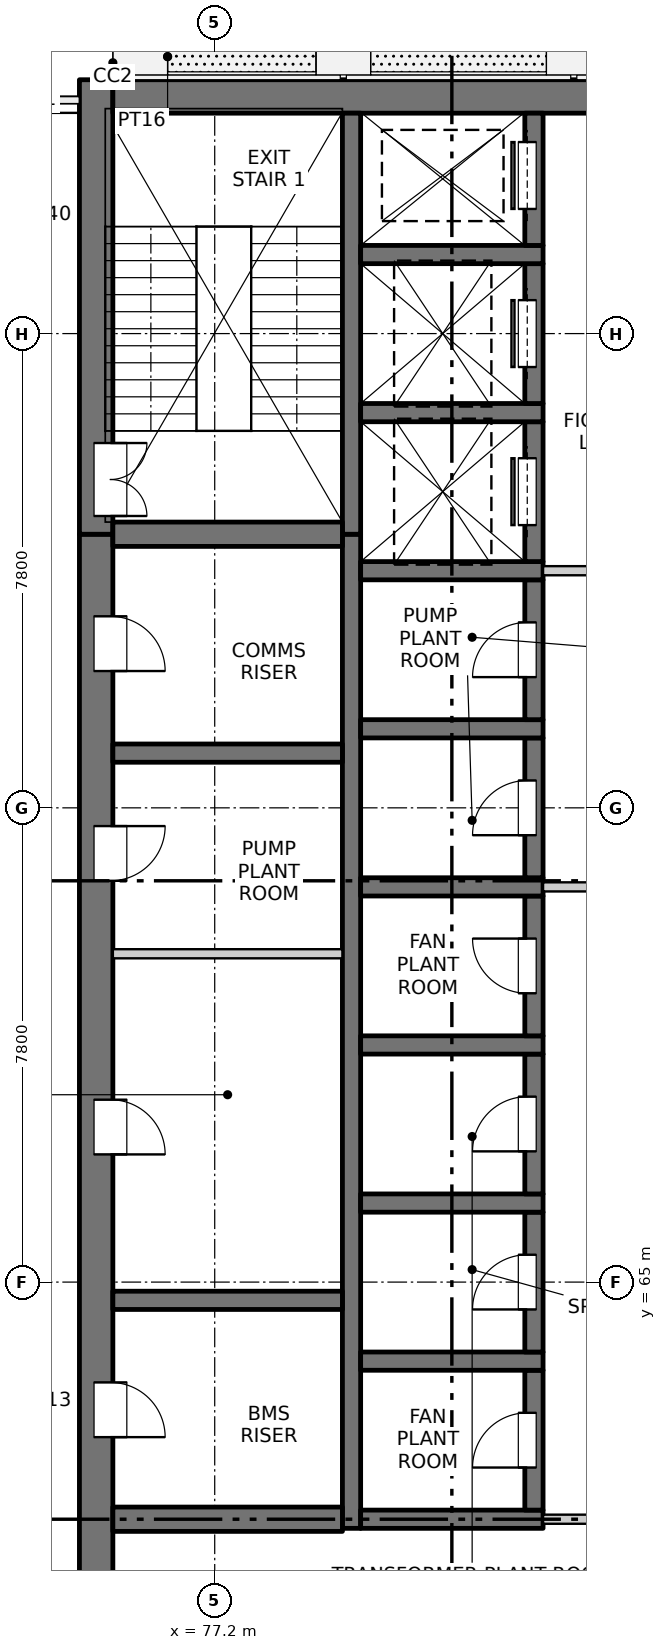
"""IFC4 building model, lengths in metres.
Left out: names, types, materials, properties, quantities, classifications, styles, units other than length and angle.
Written with IfcOpenShell. Run it as: python <this file> out.ifc"""

import sys

from ifc_helpers import new_model, si_unit, direction, frame, frame_2d, origin, place, context, subcontext, project, spatial, rectangle, extrude, element, fill, save


model = new_model("IFC4")
c1 = context("Model", 3, precision=1e-05, world=origin(), true_north=direction((0.0, 1.0)))
c2 = subcontext(c1, "Body", "Model", "MODEL_VIEW")
j1 = project(units=[si_unit("LENGTHUNIT", "METRE"), si_unit("PLANEANGLEUNIT", "RADIAN")], contexts=[c1])
p1 = place(None, origin())
s1 = spatial("IfcSite", under=j1, at=p1, CompositionType="ELEMENT")
p2 = place(p1, origin())
s2 = spatial("IfcBuilding", under=s1, at=p2, CompositionType="ELEMENT")
p3 = place(p2, frame((0.0, 0.0, 192.8)))
s3 = spatial("IfcBuildingStorey", under=s2, at=p3, CompositionType="ELEMENT", Elevation=192.8)
p4 = place(p3, frame((75.25, 54.975, -0.3), z_axis=(0.0, 0.0, 1.0), x_axis=(0.0, 1.0, 0.0)))
e1 = element("IfcWall", 1, at=p4, inside=s3, PredefinedType="SOLIDWALL", context=c2, shape_type="SweptSolid", body=[
    extrude(rectangle(XDim=22.325, YDim=0.55, at=frame_2d((11.163, 0.0))), origin(), (0.0, 0.0, 1.0), 4.5),
])
p5 = place(p4, frame((7.475, 0.0, 0.3)))
e2 = element("IfcOpeningElement", 2, at=p5, cuts=e1, PredefinedType="OPENING", context=c2, shape_type="SweptSolid", body=[
    extrude(rectangle(XDim=0.9, YDim=2.1, at=frame_2d((0.45, 1.05))), frame((0.0, 0.285, 0.0), z_axis=(0.0, -1.0, 0.0), x_axis=(1.0, 0.0, 0.0)), (0.0, 0.0, 1.0), 0.57),
])
p6 = place(p4, frame((12.125, 0.0, 0.3)))
e3 = element("IfcOpeningElement", 3, at=p6, cuts=e1, PredefinedType="OPENING", context=c2, shape_type="SweptSolid", body=[
    extrude(rectangle(XDim=0.9, YDim=2.1, at=frame_2d((0.45, 1.05))), frame((0.0, 0.285, 0.0), z_axis=(0.0, -1.0, 0.0), x_axis=(1.0, 0.0, 0.0)), (0.0, 0.0, 1.0), 0.57),
])
p7 = place(p4, frame((16.625, 0.0, 0.3)))
e4 = element("IfcOpeningElement", 4, at=p7, cuts=e1, PredefinedType="OPENING", context=c2, shape_type="SweptSolid", body=[
    extrude(rectangle(XDim=0.9, YDim=2.1, at=frame_2d((0.45, 1.05))), frame((0.0, 0.285, 0.0), z_axis=(0.0, -1.0, 0.0), x_axis=(1.0, 0.0, 0.0)), (0.0, 0.0, 1.0), 0.57),
])
p8 = place(p4, frame((20.075, 0.0, 0.3)))
e5 = element("IfcOpeningElement", 5, at=p8, cuts=e1, PredefinedType="OPENING", context=c2, shape_type="SweptSolid", body=[
    extrude(rectangle(XDim=0.9, YDim=2.1, at=frame_2d((0.45, 1.05))), frame((0.0, 0.285, 0.0), z_axis=(0.0, -1.0, 0.0), x_axis=(1.0, 0.0, 0.0)), (0.0, 0.0, 1.0), 0.57),
])
p9 = place(p3, frame((75.25, 77.3, -0.3), z_axis=(0.0, 0.0, 1.0), x_axis=(0.0, 1.0, 0.0)))
e6 = element("IfcWall", 6, at=p9, inside=s3, PredefinedType="SOLIDWALL", context=c2, shape_type="SweptSolid", body=[
    extrude(rectangle(XDim=7.475, YDim=0.55, at=frame_2d((3.737, 0.0))), origin(), (0.0, 0.0, 1.0), 4.5),
])
p10 = place(p9, frame((0.3, 0.0, 0.3)))
e7 = element("IfcOpeningElement", 7, at=p10, cuts=e6, PredefinedType="OPENING", context=c2, shape_type="SweptSolid", body=[
    extrude(rectangle(XDim=1.2, YDim=2.1, at=frame_2d((0.6, 1.05))), frame((0.0, 0.285, 0.0), z_axis=(0.0, -1.0, 0.0), x_axis=(1.0, 0.0, 0.0)), (0.0, 0.0, 1.0), 0.57),
])
p11 = place(p3, frame((75.525, 84.5, -0.3), z_axis=(0.0, 0.0, 1.0), x_axis=(1.0, 0.0, 0.0)))
e8 = element("IfcWall", 8, at=p11, inside=s3, PredefinedType="SOLIDWALL", context=c2, shape_type="SweptSolid", body=[
    extrude(rectangle(XDim=18.95, YDim=0.55, at=frame_2d((9.475, 0.0))), origin(), (0.0, 0.0, 1.0), 4.5),
])
p12 = place(p3, frame((79.45, 60.95, -0.3), z_axis=(0.0, 0.0, 1.0), x_axis=(0.0, 1.0, 0.0)))
e9 = element("IfcWall", 9, at=p12, inside=s3, PredefinedType="SOLIDWALL", context=c2, shape_type="SweptSolid", body=[
    extrude(rectangle(XDim=16.35, YDim=0.3, at=frame_2d((8.175, 0.0))), origin(), (0.0, 0.0, 1.0), 4.5),
])
p13 = place(p3, frame((79.45, 77.3, -0.3), z_axis=(0.0, 0.0, 1.0), x_axis=(0.0, 1.0, 0.0)))
e10 = element("IfcWall", 10, at=p13, inside=s3, PredefinedType="SOLIDWALL", context=c2, shape_type="SweptSolid", body=[
    extrude(rectangle(XDim=6.925, YDim=0.3, at=frame_2d((3.462, 0.0))), origin(), (0.0, 0.0, 1.0), 4.5),
])
p14 = place(p3, frame((79.6, 61.1, -0.3), z_axis=(0.0, 0.0, 1.0), x_axis=(1.0, 0.0, 0.0)))
e11 = element("IfcWall", 11, at=p14, inside=s3, PredefinedType="SOLIDWALL", context=c2, shape_type="SweptSolid", body=[
    extrude(rectangle(XDim=3.0, YDim=0.3, at=frame_2d((1.5, 0.0))), origin(), (0.0, 0.0, 1.0), 4.5),
])
p15 = place(p3, frame((82.45, 61.25, -0.3), z_axis=(0.0, 0.0, 1.0), x_axis=(0.0, 1.0, 0.0)))
e12 = element("IfcWall", 12, at=p15, inside=s3, PredefinedType="SOLIDWALL", context=c2, shape_type="SweptSolid", body=[
    extrude(rectangle(XDim=2.3, YDim=0.3, at=frame_2d((1.15, 0.0))), origin(), (0.0, 0.0, 1.0), 4.5),
])
p16 = place(p15, frame((0.7, 0.0, 0.3)))
e13 = element("IfcOpeningElement", 13, at=p16, cuts=e12, PredefinedType="OPENING", context=c2, shape_type="SweptSolid", body=[
    extrude(rectangle(XDim=0.9, YDim=2.1, at=frame_2d((0.45, 1.05))), frame((0.0, 0.16, 0.0), z_axis=(0.0, -1.0, 0.0), x_axis=(1.0, 0.0, 0.0)), (0.0, 0.0, 1.0), 0.32),
])
p17 = place(p3, frame((79.6, 63.7, -0.3), z_axis=(0.0, 0.0, 1.0), x_axis=(1.0, 0.0, 0.0)))
e14 = element("IfcWall", 14, at=p17, inside=s3, PredefinedType="SOLIDWALL", context=c2, shape_type="SweptSolid", body=[
    extrude(rectangle(XDim=3.0, YDim=0.3, at=frame_2d((1.5, 0.0))), origin(), (0.0, 0.0, 1.0), 4.5),
])
p18 = place(p3, frame((82.45, 63.85, -0.3), z_axis=(0.0, 0.0, 1.0), x_axis=(0.0, 1.0, 0.0)))
e15 = element("IfcWall", 15, at=p18, inside=s3, PredefinedType="SOLIDWALL", context=c2, shape_type="SweptSolid", body=[
    extrude(rectangle(XDim=2.3, YDim=0.3, at=frame_2d((1.15, 0.0))), origin(), (0.0, 0.0, 1.0), 4.5),
])
p19 = place(p18, frame((0.7, 0.0, 0.3)))
e16 = element("IfcOpeningElement", 16, at=p19, cuts=e15, PredefinedType="OPENING", context=c2, shape_type="SweptSolid", body=[
    extrude(rectangle(XDim=0.9, YDim=2.1, at=frame_2d((0.45, 1.05))), frame((0.0, 0.16, 0.0), z_axis=(0.0, -1.0, 0.0), x_axis=(1.0, 0.0, 0.0)), (0.0, 0.0, 1.0), 0.32),
])
p20 = place(p3, frame((79.6, 66.3, -0.3), z_axis=(0.0, 0.0, 1.0), x_axis=(1.0, 0.0, 0.0)))
e17 = element("IfcWall", 17, at=p20, inside=s3, PredefinedType="SOLIDWALL", context=c2, shape_type="SweptSolid", body=[
    extrude(rectangle(XDim=3.0, YDim=0.3, at=frame_2d((1.5, 0.0))), origin(), (0.0, 0.0, 1.0), 4.5),
])
p21 = place(p3, frame((82.45, 66.45, -0.3), z_axis=(0.0, 0.0, 1.0), x_axis=(0.0, 1.0, 0.0)))
e18 = element("IfcWall", 18, at=p21, inside=s3, PredefinedType="SOLIDWALL", context=c2, shape_type="SweptSolid", body=[
    extrude(rectangle(XDim=2.3, YDim=0.3, at=frame_2d((1.15, 0.0))), origin(), (0.0, 0.0, 1.0), 4.5),
])
p22 = place(p21, frame((0.7, 0.0, 0.3)))
e19 = element("IfcOpeningElement", 19, at=p22, cuts=e18, PredefinedType="OPENING", context=c2, shape_type="SweptSolid", body=[
    extrude(rectangle(XDim=0.9, YDim=2.1, at=frame_2d((0.45, 1.05))), frame((0.0, 0.16, 0.0), z_axis=(0.0, -1.0, 0.0), x_axis=(1.0, 0.0, 0.0)), (0.0, 0.0, 1.0), 0.32),
])
p23 = place(p3, frame((79.6, 68.9, -0.3), z_axis=(0.0, 0.0, 1.0), x_axis=(1.0, 0.0, 0.0)))
e20 = element("IfcWall", 20, at=p23, inside=s3, PredefinedType="SOLIDWALL", context=c2, shape_type="SweptSolid", body=[
    extrude(rectangle(XDim=3.0, YDim=0.3, at=frame_2d((1.5, 0.0))), origin(), (0.0, 0.0, 1.0), 4.5),
])
p24 = place(p3, frame((82.45, 69.05, -0.3), z_axis=(0.0, 0.0, 1.0), x_axis=(0.0, 1.0, 0.0)))
e21 = element("IfcWall", 21, at=p24, inside=s3, PredefinedType="SOLIDWALL", context=c2, shape_type="SweptSolid", body=[
    extrude(rectangle(XDim=2.3, YDim=0.3, at=frame_2d((1.15, 0.0))), origin(), (0.0, 0.0, 1.0), 4.5),
])
p25 = place(p24, frame((0.7, 0.0, 0.3)))
e22 = element("IfcOpeningElement", 22, at=p25, cuts=e21, PredefinedType="OPENING", context=c2, shape_type="SweptSolid", body=[
    extrude(rectangle(XDim=0.9, YDim=2.1, at=frame_2d((0.45, 1.05))), frame((0.0, 0.16, 0.0), z_axis=(0.0, -1.0, 0.0), x_axis=(1.0, 0.0, 0.0)), (0.0, 0.0, 1.0), 0.32),
])
p26 = place(p3, frame((79.6, 71.5, -0.3), z_axis=(0.0, 0.0, 1.0), x_axis=(1.0, 0.0, 0.0)))
e23 = element("IfcWall", 23, at=p26, inside=s3, PredefinedType="SOLIDWALL", context=c2, shape_type="SweptSolid", body=[
    extrude(rectangle(XDim=3.0, YDim=0.3, at=frame_2d((1.5, 0.0))), origin(), (0.0, 0.0, 1.0), 4.5),
])
p27 = place(p3, frame((82.45, 71.65, -0.3), z_axis=(0.0, 0.0, 1.0), x_axis=(0.0, 1.0, 0.0)))
e24 = element("IfcWall", 24, at=p27, inside=s3, PredefinedType="SOLIDWALL", context=c2, shape_type="SweptSolid", body=[
    extrude(rectangle(XDim=2.3, YDim=0.3, at=frame_2d((1.15, 0.0))), origin(), (0.0, 0.0, 1.0), 4.5),
])
p28 = place(p27, frame((0.7, 0.0, 0.3)))
e25 = element("IfcOpeningElement", 25, at=p28, cuts=e24, PredefinedType="OPENING", context=c2, shape_type="SweptSolid", body=[
    extrude(rectangle(XDim=0.9, YDim=2.1, at=frame_2d((0.45, 1.05))), frame((0.0, 0.16, 0.0), z_axis=(0.0, -1.0, 0.0), x_axis=(1.0, 0.0, 0.0)), (0.0, 0.0, 1.0), 0.32),
])
p29 = place(p3, frame((79.6, 74.1, -0.3), z_axis=(0.0, 0.0, 1.0), x_axis=(1.0, 0.0, 0.0)))
e26 = element("IfcWall", 26, at=p29, inside=s3, PredefinedType="SOLIDWALL", context=c2, shape_type="SweptSolid", body=[
    extrude(rectangle(XDim=3.0, YDim=0.3, at=frame_2d((1.5, 0.0))), origin(), (0.0, 0.0, 1.0), 4.5),
])
p30 = place(p3, frame((82.45, 74.25, -0.3), z_axis=(0.0, 0.0, 1.0), x_axis=(0.0, 1.0, 0.0)))
e27 = element("IfcWall", 27, at=p30, inside=s3, PredefinedType="SOLIDWALL", context=c2, shape_type="SweptSolid", body=[
    extrude(rectangle(XDim=2.3, YDim=0.3, at=frame_2d((1.15, 0.0))), origin(), (0.0, 0.0, 1.0), 4.5),
])
p31 = place(p30, frame((0.7, 0.0, 0.3)))
e28 = element("IfcOpeningElement", 28, at=p31, cuts=e27, PredefinedType="OPENING", context=c2, shape_type="SweptSolid", body=[
    extrude(rectangle(XDim=0.9, YDim=2.1, at=frame_2d((0.45, 1.05))), frame((0.0, 0.16, 0.0), z_axis=(0.0, -1.0, 0.0), x_axis=(1.0, 0.0, 0.0)), (0.0, 0.0, 1.0), 0.32),
])
p32 = place(p3, frame((79.6, 76.7, -0.3), z_axis=(0.0, 0.0, 1.0), x_axis=(1.0, 0.0, 0.0)))
e29 = element("IfcWall", 29, at=p32, inside=s3, PredefinedType="SOLIDWALL", context=c2, shape_type="SweptSolid", body=[
    extrude(rectangle(XDim=3.0, YDim=0.3, at=frame_2d((1.5, 0.0))), origin(), (0.0, 0.0, 1.0), 4.5),
])
p33 = place(p3, frame((82.45, 76.85, -0.3), z_axis=(0.0, 0.0, 1.0), x_axis=(0.0, 1.0, 0.0)))
e30 = element("IfcWall", 30, at=p33, inside=s3, PredefinedType="SOLIDWALL", context=c2, shape_type="SweptSolid", body=[
    extrude(rectangle(XDim=2.3, YDim=0.3, at=frame_2d((1.15, 0.0))), origin(), (0.0, 0.0, 1.0), 4.5),
])
p34 = place(p33, frame((0.6, 0.0, 0.3)))
e31 = element("IfcOpeningElement", 31, at=p34, cuts=e30, PredefinedType="OPENING", context=c2, shape_type="SweptSolid", body=[
    extrude(rectangle(XDim=1.1, YDim=2.1, at=frame_2d((0.55, 1.05))), frame((0.0, 0.16, 0.0), z_axis=(0.0, -1.0, 0.0), x_axis=(1.0, 0.0, 0.0)), (0.0, 0.0, 1.0), 0.32),
])
p35 = place(p3, frame((79.6, 79.3, -0.3), z_axis=(0.0, 0.0, 1.0), x_axis=(1.0, 0.0, 0.0)))
e32 = element("IfcWall", 32, at=p35, inside=s3, PredefinedType="SOLIDWALL", context=c2, shape_type="SweptSolid", body=[
    extrude(rectangle(XDim=3.0, YDim=0.3, at=frame_2d((1.5, 0.0))), origin(), (0.0, 0.0, 1.0), 4.5),
])
p36 = place(p3, frame((82.45, 79.45, -0.3), z_axis=(0.0, 0.0, 1.0), x_axis=(0.0, 1.0, 0.0)))
e33 = element("IfcWall", 33, at=p36, inside=s3, PredefinedType="SOLIDWALL", context=c2, shape_type="SweptSolid", body=[
    extrude(rectangle(XDim=2.3, YDim=0.3, at=frame_2d((1.15, 0.0))), origin(), (0.0, 0.0, 1.0), 4.5),
])
p37 = place(p36, frame((0.6, 0.0, 0.3)))
e34 = element("IfcOpeningElement", 34, at=p37, cuts=e33, PredefinedType="OPENING", context=c2, shape_type="SweptSolid", body=[
    extrude(rectangle(XDim=1.1, YDim=2.1, at=frame_2d((0.55, 1.05))), frame((0.0, 0.16, 0.0), z_axis=(0.0, -1.0, 0.0), x_axis=(1.0, 0.0, 0.0)), (0.0, 0.0, 1.0), 0.32),
])
p38 = place(p3, frame((79.6, 81.9, -0.3), z_axis=(0.0, 0.0, 1.0), x_axis=(1.0, 0.0, 0.0)))
e35 = element("IfcWall", 35, at=p38, inside=s3, PredefinedType="SOLIDWALL", context=c2, shape_type="SweptSolid", body=[
    extrude(rectangle(XDim=3.0, YDim=0.3, at=frame_2d((1.5, 0.0))), origin(), (0.0, 0.0, 1.0), 4.5),
])
p39 = place(p3, frame((82.45, 82.05, -0.3), z_axis=(0.0, 0.0, 1.0), x_axis=(0.0, 1.0, 0.0)))
e36 = element("IfcWall", 36, at=p39, inside=s3, PredefinedType="SOLIDWALL", context=c2, shape_type="SweptSolid", body=[
    extrude(rectangle(XDim=2.175, YDim=0.3, at=frame_2d((1.087, 0.0))), origin(), (0.0, 0.0, 1.0), 4.5),
])
p40 = place(p39, frame((0.6, 0.0, 0.3)))
e37 = element("IfcOpeningElement", 37, at=p40, cuts=e36, PredefinedType="OPENING", context=c2, shape_type="SweptSolid", body=[
    extrude(rectangle(XDim=1.1, YDim=2.1, at=frame_2d((0.55, 1.05))), frame((0.0, 0.16, 0.0), z_axis=(0.0, -1.0, 0.0), x_axis=(1.0, 0.0, 0.0)), (0.0, 0.0, 1.0), 0.32),
])
p41 = place(p3, frame((75.525, 61.1, -0.3), z_axis=(0.0, 0.0, 1.0), x_axis=(1.0, 0.0, 0.0)))
e38 = element("IfcWall", 38, at=p41, inside=s3, PredefinedType="SOLIDWALL", context=c2, shape_type="SweptSolid", body=[
    extrude(rectangle(XDim=3.775, YDim=0.4, at=frame_2d((1.888, 0.0))), origin(), (0.0, 0.0, 1.0), 4.5),
])
for number, where, z_axis, x_axis in (
    (39, (75.525, 64.7, -0.3), (0.0, 0.0, 1.0), (1.0, 0.0, 0.0)),
    (40, (75.525, 73.7, -0.3), (0.0, 0.0, 1.0), (1.0, 0.0, 0.0)),
):
    element("IfcWall", number, at=place(p3, frame(where, z_axis=z_axis, x_axis=x_axis)), inside=s3, PredefinedType="SOLIDWALL", context=c2, shape_type="SweptSolid", body=[
        extrude(rectangle(XDim=3.775, YDim=0.3, at=frame_2d((1.888, 0.0))), origin(), (0.0, 0.0, 1.0), 4.5),
    ])
p42 = place(p3, frame((75.525, 77.3, -0.3), z_axis=(0.0, 0.0, 1.0), x_axis=(1.0, 0.0, 0.0)))
e41 = element("IfcWall", 41, at=p42, inside=s3, PredefinedType="SOLIDWALL", context=c2, shape_type="SweptSolid", body=[
    extrude(rectangle(XDim=3.775, YDim=0.4, at=frame_2d((1.888, 0.0))), origin(), (0.0, 0.0, 1.0), 4.5),
])
p43 = place(p3, frame((82.6, 61.1, 0.0), z_axis=(0.0, 0.0, 1.0), x_axis=(1.0, 0.0, 0.0)))
e42 = element("IfcWall", 42, at=p43, inside=s3, PredefinedType="PARTITIONING", context=c2, shape_type="SweptSolid", body=[
    extrude(rectangle(XDim=4.8, YDim=0.15, at=frame_2d((2.4, 0.0))), origin(), (0.0, 0.0, 1.0), 4.2),
])
p44 = place(p43, frame((1.5, 0.0, 0.0)))
e43 = element("IfcOpeningElement", 43, at=p44, cuts=e42, PredefinedType="OPENING", context=c2, shape_type="SweptSolid", body=[
    extrude(rectangle(XDim=1.8, YDim=2.1, at=frame_2d((0.9, 1.05))), frame((0.0, 0.085, 0.0), z_axis=(0.0, -1.0, 0.0), x_axis=(1.0, 0.0, 0.0)), (0.0, 0.0, 1.0), 0.17),
])
p45 = place(p3, frame((75.525, 70.4, 0.0), z_axis=(0.0, 0.0, 1.0), x_axis=(1.0, 0.0, 0.0)))
e44 = element("IfcWall", 44, at=p45, inside=s3, PredefinedType="PARTITIONING", context=c2, shape_type="SweptSolid", body=[
    extrude(rectangle(XDim=3.775, YDim=0.15, at=frame_2d((1.887, 0.0))), origin(), (0.0, 0.0, 1.0), 4.2),
])
p46 = place(p3, frame((82.6, 71.5, 0.0), z_axis=(0.0, 0.0, 1.0), x_axis=(1.0, 0.0, 0.0)))
e45 = element("IfcWall", 45, at=p46, inside=s3, PredefinedType="PARTITIONING", context=c2, shape_type="SweptSolid", body=[
    extrude(rectangle(XDim=4.8, YDim=0.15, at=frame_2d((2.4, 0.0))), origin(), (0.0, 0.0, 1.0), 4.2),
])
p47 = place(p46, frame((1.5, 0.0, 0.0)))
e46 = element("IfcOpeningElement", 46, at=p47, cuts=e45, PredefinedType="OPENING", context=c2, shape_type="SweptSolid", body=[
    extrude(rectangle(XDim=1.8, YDim=2.1, at=frame_2d((0.9, 1.05))), frame((0.0, 0.085, 0.0), z_axis=(0.0, -1.0, 0.0), x_axis=(1.0, 0.0, 0.0)), (0.0, 0.0, 1.0), 0.17),
])
p48 = place(p3, frame((82.6, 76.7, 0.0), z_axis=(0.0, 0.0, 1.0), x_axis=(1.0, 0.0, 0.0)))
e47 = element("IfcWall", 47, at=p48, inside=s3, PredefinedType="PARTITIONING", context=c2, shape_type="SweptSolid", body=[
    extrude(rectangle(XDim=4.8, YDim=0.15, at=frame_2d((2.4, 0.0))), origin(), (0.0, 0.0, 1.0), 4.2),
])
p49 = place(p48, frame((1.5, 0.0, 0.0)))
e48 = element("IfcOpeningElement", 48, at=p49, cuts=e47, PredefinedType="OPENING", context=c2, shape_type="SweptSolid", body=[
    extrude(rectangle(XDim=1.8, YDim=2.1, at=frame_2d((0.9, 1.05))), frame((0.0, 0.085, 0.0), z_axis=(0.0, -1.0, 0.0), x_axis=(1.0, 0.0, 0.0)), (0.0, 0.0, 1.0), 0.17),
])
p50 = place(p16, origin())
e49 = element("IfcDoor", 49, at=p50, inside=s3, OperationType="SINGLE_SWING_LEFT", PredefinedType="DOOR", context=c2, shape_type="SweptSolid", body=[
    extrude(rectangle(XDim=0.9, YDim=2.1, at=frame_2d((0.45, 1.05))), frame((0.0, 0.135, 0.0), z_axis=(0.0, -1.0, 0.0), x_axis=(1.0, 0.0, 0.0)), (0.0, 0.0, 1.0), 0.05),
])
fill(e13, e49)
p51 = place(p5, origin())
e50 = element("IfcDoor", 50, at=p51, inside=s3, OperationType="SINGLE_SWING_RIGHT", PredefinedType="DOOR", context=c2, shape_type="SweptSolid", body=[
    extrude(rectangle(XDim=0.9, YDim=2.1, at=frame_2d((0.45, 1.05))), frame((0.0, -0.21, 0.0), z_axis=(0.0, -1.0, 0.0), x_axis=(1.0, 0.0, 0.0)), (0.0, 0.0, 1.0), 0.05),
])
fill(e2, e50)
p52 = place(p19, origin())
e51 = element("IfcDoor", 51, at=p52, inside=s3, OperationType="SINGLE_SWING_LEFT", PredefinedType="DOOR", context=c2, shape_type="SweptSolid", body=[
    extrude(rectangle(XDim=0.9, YDim=2.1, at=frame_2d((0.45, 1.05))), frame((0.0, 0.135, 0.0), z_axis=(0.0, -1.0, 0.0), x_axis=(1.0, 0.0, 0.0)), (0.0, 0.0, 1.0), 0.05),
])
fill(e16, e51)
p53 = place(p6, origin())
e52 = element("IfcDoor", 52, at=p53, inside=s3, OperationType="SINGLE_SWING_RIGHT", PredefinedType="DOOR", context=c2, shape_type="SweptSolid", body=[
    extrude(rectangle(XDim=0.9, YDim=2.1, at=frame_2d((0.45, 1.05))), frame((0.0, -0.21, 0.0), z_axis=(0.0, -1.0, 0.0), x_axis=(1.0, 0.0, 0.0)), (0.0, 0.0, 1.0), 0.05),
])
fill(e3, e52)
p54 = place(p22, origin())
e53 = element("IfcDoor", 53, at=p54, inside=s3, OperationType="SINGLE_SWING_LEFT", PredefinedType="DOOR", context=c2, shape_type="SweptSolid", body=[
    extrude(rectangle(XDim=0.9, YDim=2.1, at=frame_2d((0.45, 1.05))), frame((0.0, 0.135, 0.0), z_axis=(0.0, -1.0, 0.0), x_axis=(1.0, 0.0, 0.0)), (0.0, 0.0, 1.0), 0.05),
])
fill(e19, e53)
p55 = place(p25, origin())
e54 = element("IfcDoor", 54, at=p55, inside=s3, OperationType="SINGLE_SWING_RIGHT", PredefinedType="DOOR", context=c2, shape_type="SweptSolid", body=[
    extrude(rectangle(XDim=0.9, YDim=2.1, at=frame_2d((0.45, 1.05))), frame((0.0, 0.135, 0.0), z_axis=(0.0, -1.0, 0.0), x_axis=(1.0, 0.0, 0.0)), (0.0, 0.0, 1.0), 0.05),
])
fill(e22, e54)
p56 = place(p7, origin())
e55 = element("IfcDoor", 55, at=p56, inside=s3, OperationType="SINGLE_SWING_LEFT", PredefinedType="DOOR", context=c2, shape_type="SweptSolid", body=[
    extrude(rectangle(XDim=0.9, YDim=2.1, at=frame_2d((0.45, 1.05))), frame((0.0, -0.21, 0.0), z_axis=(0.0, -1.0, 0.0), x_axis=(1.0, 0.0, 0.0)), (0.0, 0.0, 1.0), 0.05),
])
fill(e4, e55)
p57 = place(p28, origin())
e56 = element("IfcDoor", 56, at=p57, inside=s3, OperationType="SINGLE_SWING_LEFT", PredefinedType="DOOR", context=c2, shape_type="SweptSolid", body=[
    extrude(rectangle(XDim=0.9, YDim=2.1, at=frame_2d((0.45, 1.05))), frame((0.0, 0.135, 0.0), z_axis=(0.0, -1.0, 0.0), x_axis=(1.0, 0.0, 0.0)), (0.0, 0.0, 1.0), 0.05),
])
fill(e25, e56)
p58 = place(p31, origin())
e57 = element("IfcDoor", 57, at=p58, inside=s3, OperationType="SINGLE_SWING_LEFT", PredefinedType="DOOR", context=c2, shape_type="SweptSolid", body=[
    extrude(rectangle(XDim=0.9, YDim=2.1, at=frame_2d((0.45, 1.05))), frame((0.0, 0.135, 0.0), z_axis=(0.0, -1.0, 0.0), x_axis=(1.0, 0.0, 0.0)), (0.0, 0.0, 1.0), 0.05),
])
fill(e28, e57)
p59 = place(p8, origin())
e58 = element("IfcDoor", 58, at=p59, inside=s3, OperationType="SINGLE_SWING_RIGHT", PredefinedType="DOOR", context=c2, shape_type="SweptSolid", body=[
    extrude(rectangle(XDim=0.9, YDim=2.1, at=frame_2d((0.45, 1.05))), frame((0.0, -0.21, 0.0), z_axis=(0.0, -1.0, 0.0), x_axis=(1.0, 0.0, 0.0)), (0.0, 0.0, 1.0), 0.05),
])
fill(e5, e58)
p60 = place(p34, origin())
e59 = element("IfcDoor", 59, at=p60, inside=s3, OperationType="SLIDING_TO_LEFT", PredefinedType="DOOR", context=c2, shape_type="SweptSolid", body=[
    extrude(rectangle(XDim=1.1, YDim=2.1, at=frame_2d((0.55, 1.05))), frame((0.0, 0.135, 0.0), z_axis=(0.0, -1.0, 0.0), x_axis=(1.0, 0.0, 0.0)), (0.0, 0.0, 1.0), 0.05),
])
fill(e31, e59)
p61 = place(p10, origin())
e60 = element("IfcDoor", 60, at=p61, inside=s3, OperationType="DOUBLE_DOOR_SINGLE_SWING", PredefinedType="DOOR", context=c2, shape_type="SweptSolid", body=[
    extrude(rectangle(XDim=1.2, YDim=2.1, at=frame_2d((0.6, 1.05))), frame((0.0, -0.21, 0.0), z_axis=(0.0, -1.0, 0.0), x_axis=(1.0, 0.0, 0.0)), (0.0, 0.0, 1.0), 0.05),
])
fill(e7, e60)
p62 = place(p37, origin())
e61 = element("IfcDoor", 61, at=p62, inside=s3, OperationType="SLIDING_TO_LEFT", PredefinedType="DOOR", context=c2, shape_type="SweptSolid", body=[
    extrude(rectangle(XDim=1.1, YDim=2.1, at=frame_2d((0.55, 1.05))), frame((0.0, 0.135, 0.0), z_axis=(0.0, -1.0, 0.0), x_axis=(1.0, 0.0, 0.0)), (0.0, 0.0, 1.0), 0.05),
])
fill(e34, e61)
p63 = place(p40, origin())
e62 = element("IfcDoor", 62, at=p63, inside=s3, OperationType="SLIDING_TO_RIGHT", PredefinedType="DOOR", context=c2, shape_type="SweptSolid", body=[
    extrude(rectangle(XDim=1.1, YDim=2.1, at=frame_2d((0.55, 1.05))), frame((0.0, 0.135, 0.0), z_axis=(0.0, -1.0, 0.0), x_axis=(1.0, 0.0, 0.0)), (0.0, 0.0, 1.0), 0.05),
])
fill(e37, e62)
save(model, sys.argv[1])
